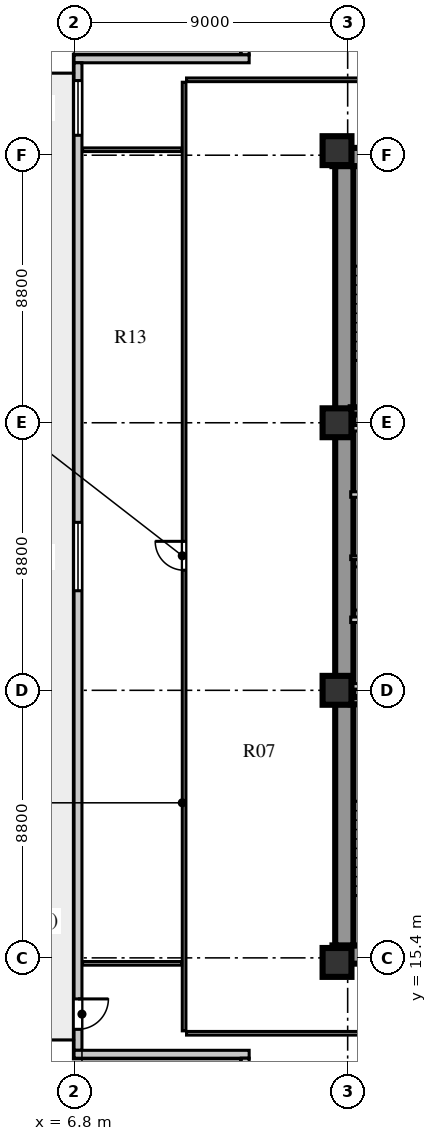
"""IFC4 building model, lengths in metres.
Left out: names, types, materials, properties, quantities, classifications, styles, units other than length and angle.
Written with IfcOpenShell. Run it as: python <this file> out.ifc"""

import sys

from ifc_helpers import new_model, si_unit, direction, frame, frame_2d, origin, origin_2d, place, context, subcontext, project, spatial, rectangle, extrude, element, fill, save


model = new_model("IFC4")
c1 = context("Model", 3, precision=1e-05, world=origin(), true_north=direction((0.0, 1.0)))
c2 = subcontext(c1, "Body", "Model", "MODEL_VIEW")
j1 = project(units=[si_unit("LENGTHUNIT", "METRE"), si_unit("PLANEANGLEUNIT", "RADIAN")], contexts=[c1])
p1 = place(None, origin())
s1 = spatial("IfcSite", under=j1, at=p1, CompositionType="ELEMENT")
p2 = place(p1, origin())
s2 = spatial("IfcBuilding", under=s1, at=p2, CompositionType="ELEMENT")
p3 = place(p2, frame((0.0, 0.0, 26.0)))
s3 = spatial("IfcBuildingStorey", under=s2, at=p3, CompositionType="ELEMENT", Elevation=26.0)
for number, where, z_axis, x_axis in (
    (1, (15.3, 15.51, 0.0), (0.0, 0.0, 1.0), (1.0, 0.0, 0.0)),
    (2, (15.3, 41.74, 0.0), (0.0, 0.0, 1.0), (1.0, 0.0, 0.0)),
):
    element("IfcWall", number, at=place(p3, frame(where, z_axis=z_axis, x_axis=x_axis)), inside=s3, PredefinedType="SHEAR", context=c2, shape_type="SweptSolid", body=[
        extrude(rectangle(XDim=9.88, YDim=0.6, at=frame_2d((4.94, 0.0))), origin(), (0.0, 0.0, 1.0), 3.72),
    ])
p4 = place(p3, frame((15.69, 15.81, 0.0), z_axis=(0.0, 0.0, 1.0), x_axis=(0.0, 1.0, 0.0)))
e3 = element("IfcWall", 3, at=p4, inside=s3, PredefinedType="SHEAR", context=c2, shape_type="SweptSolid", body=[
    extrude(rectangle(XDim=25.63, YDim=0.6, at=frame_2d((12.815, 0.0))), origin(), (0.0, 0.0, 1.0), 3.72),
])
for number, where, z_axis, x_axis in (
    (4, (15.45, 15.25, 0.0), (0.0, 0.0, 1.0), (1.0, 0.0, 0.0)),
    (5, (15.45, 24.2, 0.0), (0.0, 0.0, 1.0), (1.0, 0.0, 0.0)),
    (6, (15.45, 33.0, 0.0), (0.0, 0.0, 1.0), (1.0, 0.0, 0.0)),
    (7, (15.45, 41.95, 0.0), (0.0, 0.0, 1.0), (1.0, 0.0, 0.0)),
):
    element("IfcColumn", number, at=place(p3, frame(where, z_axis=z_axis, x_axis=x_axis)), inside=s3, PredefinedType="COLUMN", context=c2, shape_type="SweptSolid", body=[
        extrude(rectangle(XDim=0.95, YDim=0.95, at=origin_2d()), origin(), (0.0, 0.0, 1.0), 3.72),
    ])
p5 = place(p3, frame((12.43, 50.34, 0.0), z_axis=(0.0, 0.0, 1.0), x_axis=(0.0, -1.0, 0.0)))
e8 = element("IfcWall", 8, at=p5, inside=s3, PredefinedType="SOLIDWALL", context=c2, shape_type="SweptSolid", body=[
    extrude(rectangle(XDim=5.24, YDim=0.26, at=frame_2d((2.62, 0.0))), origin(), (0.0, 0.0, 1.0), 3.72),
])
p6 = place(p3, frame((12.56, 44.97, 0.0), z_axis=(0.0, 0.0, 1.0), x_axis=(-1.0, 0.0, 0.0)))
e9 = element("IfcWall", 9, at=p6, inside=s3, PredefinedType="SOLIDWALL", context=c2, shape_type="SweptSolid", body=[
    extrude(rectangle(XDim=5.76, YDim=0.26, at=frame_2d((2.88, 0.0))), origin(), (0.0, 0.0, 1.0), 3.72),
])
p7 = place(p3, frame((6.93, 44.84, 0.0), z_axis=(0.0, 0.0, 1.0), x_axis=(0.0, -1.0, 0.0)))
e10 = element("IfcWall", 10, at=p7, inside=s3, PredefinedType="SOLIDWALL", context=c2, shape_type="SweptSolid", body=[
    extrude(rectangle(XDim=32.48, YDim=0.26, at=frame_2d((16.24, 0.0))), origin(), (0.0, 0.0, 1.0), 3.72),
])
p8 = place(p7, frame((30.79, 0.0, 0.0)))
e11 = element("IfcOpeningElement", 11, at=p8, cuts=e10, PredefinedType="OPENING", context=c2, shape_type="SweptSolid", body=[
    extrude(rectangle(XDim=1.0, YDim=2.05, at=frame_2d((0.5, 1.025))), frame((0.0, 0.14, 0.0), z_axis=(0.0, -1.0, 0.0), x_axis=(1.0, 0.0, 0.0)), (0.0, 0.0, 1.0), 0.28),
])
p9 = place(p7, frame((15.115, 0.0, 0.8)))
e12 = element("IfcOpeningElement", 12, at=p9, cuts=e10, PredefinedType="OPENING", context=c2, shape_type="SweptSolid", body=[
    extrude(rectangle(XDim=2.25, YDim=2.0, at=frame_2d((1.125, 1.0))), frame((0.0, 0.14, 0.0), z_axis=(0.0, -1.0, 0.0), x_axis=(1.0, 0.0, 0.0)), (0.0, 0.0, 1.0), 0.28),
])
p10 = place(p7, frame((0.585, 0.0, 0.8)))
e13 = element("IfcOpeningElement", 13, at=p10, cuts=e10, PredefinedType="OPENING", context=c2, shape_type="SweptSolid", body=[
    extrude(rectangle(XDim=1.8, YDim=2.0, at=frame_2d((0.9, 1.0))), frame((0.0, 0.14, 0.0), z_axis=(0.0, -1.0, 0.0), x_axis=(1.0, 0.0, 0.0)), (0.0, 0.0, 1.0), 0.28),
])
p11 = place(p3, frame((6.8, 12.23, 0.0), z_axis=(0.0, 0.0, 1.0), x_axis=(1.0, 0.0, 0.0)))
e14 = element("IfcWall", 14, at=p11, inside=s3, PredefinedType="SOLIDWALL", context=c2, shape_type="SweptSolid", body=[
    extrude(rectangle(XDim=5.76, YDim=0.26, at=frame_2d((2.88, 0.0))), origin(), (0.0, 0.0, 1.0), 3.72),
])
p12 = place(p3, frame((12.43, 12.1, 0.0), z_axis=(0.0, 0.0, 1.0), x_axis=(0.0, -1.0, 0.0)))
e15 = element("IfcWall", 15, at=p12, inside=s3, PredefinedType="SOLIDWALL", context=c2, shape_type="SweptSolid", body=[
    extrude(rectangle(XDim=5.24, YDim=0.26, at=frame_2d((2.62, 0.0))), origin(), (0.0, 0.0, 1.0), 3.72),
])
p13 = place(p3, frame((15.9, 23.86, 0.0), z_axis=(0.0, 0.0, 1.0), x_axis=(1.0, 0.0, 0.0)))
e16 = element("IfcWall", 16, at=p13, inside=s3, PredefinedType="SHEAR", context=c2, shape_type="SweptSolid", body=[
    extrude(rectangle(XDim=3.52, YDim=0.24, at=frame_2d((1.76, 0.0))), origin(), (0.0, 0.0, 1.0), 4.0),
])
p14 = place(p3, frame((15.9, 26.52, 0.0), z_axis=(0.0, 0.0, 1.0), x_axis=(1.0, 0.0, 0.0)))
e17 = element("IfcWall", 17, at=p14, inside=s3, PredefinedType="SOLIDWALL", context=c2, shape_type="SweptSolid", body=[
    extrude(rectangle(XDim=8.68, YDim=0.18, at=frame_2d((4.34, 0.0))), origin(), (0.0, 0.0, 1.0), 3.72),
])
p15 = place(p14, frame((1.76, 0.0, 0.0)))
e18 = element("IfcOpeningElement", 18, at=p15, cuts=e17, PredefinedType="OPENING", context=c2, shape_type="SweptSolid", body=[
    extrude(rectangle(XDim=1.0, YDim=2.1, at=frame_2d((0.5, 1.05))), frame((0.0, 0.1, 0.0), z_axis=(0.0, -1.0, 0.0), x_axis=(1.0, 0.0, 0.0)), (0.0, 0.0, 1.0), 0.2),
])
p16 = place(p14, frame((3.6, 0.0, 0.0)))
e19 = element("IfcOpeningElement", 19, at=p16, cuts=e17, PredefinedType="OPENING", context=c2, shape_type="SweptSolid", body=[
    extrude(rectangle(XDim=1.0, YDim=2.1, at=frame_2d((0.5, 1.05))), frame((0.0, 0.1, 0.0), z_axis=(0.0, -1.0, 0.0), x_axis=(1.0, 0.0, 0.0)), (0.0, 0.0, 1.0), 0.2),
])
p17 = place(p14, frame((5.44, 0.0, 0.0)))
e20 = element("IfcOpeningElement", 20, at=p17, cuts=e17, PredefinedType="OPENING", context=c2, shape_type="SweptSolid", body=[
    extrude(rectangle(XDim=1.0, YDim=2.1, at=frame_2d((0.5, 1.05))), frame((0.0, 0.1, 0.0), z_axis=(0.0, -1.0, 0.0), x_axis=(1.0, 0.0, 0.0)), (0.0, 0.0, 1.0), 0.2),
])
p18 = place(p14, frame((7.28, 0.0, 0.0)))
e21 = element("IfcOpeningElement", 21, at=p18, cuts=e17, PredefinedType="OPENING", context=c2, shape_type="SweptSolid", body=[
    extrude(rectangle(XDim=1.0, YDim=2.1, at=frame_2d((0.5, 1.05))), frame((0.0, 0.1, 0.0), z_axis=(0.0, -1.0, 0.0), x_axis=(1.0, 0.0, 0.0)), (0.0, 0.0, 1.0), 0.2),
])
p19 = place(p3, frame((15.9, 24.33, 0.0), z_axis=(0.0, 0.0, 1.0), x_axis=(1.0, 0.0, 0.0)))
e22 = element("IfcWall", 22, at=p19, inside=s3, PredefinedType="SOLIDWALL", context=c2, shape_type="SweptSolid", body=[
    extrude(rectangle(XDim=8.68, YDim=0.18, at=frame_2d((4.34, 0.0))), origin(), (0.0, 0.0, 1.0), 3.02),
])
p20 = place(p3, frame((15.9, 28.56, 0.0), z_axis=(0.0, 0.0, 1.0), x_axis=(1.0, 0.0, 0.0)))
e23 = element("IfcWall", 23, at=p20, inside=s3, PredefinedType="PARTITIONING", context=c2, shape_type="SweptSolid", body=[
    extrude(rectangle(XDim=1.2, YDim=0.12, at=frame_2d((0.6, 0.0))), origin(), (0.0, 0.0, 1.0), 3.72),
])
p21 = place(p3, frame((15.9, 30.64, 0.0), z_axis=(0.0, 0.0, 1.0), x_axis=(1.0, 0.0, 0.0)))
e24 = element("IfcWall", 24, at=p21, inside=s3, PredefinedType="SOLIDWALL", context=c2, shape_type="SweptSolid", body=[
    extrude(rectangle(XDim=8.68, YDim=0.18, at=frame_2d((4.34, 0.0))), origin(), (0.0, 0.0, 1.0), 3.72),
])
p22 = place(p21, frame((1.76, 0.0, 0.0)))
e25 = element("IfcOpeningElement", 25, at=p22, cuts=e24, PredefinedType="OPENING", context=c2, shape_type="SweptSolid", body=[
    extrude(rectangle(XDim=1.0, YDim=2.1, at=frame_2d((0.5, 1.05))), frame((0.0, 0.1, 0.0), z_axis=(0.0, -1.0, 0.0), x_axis=(1.0, 0.0, 0.0)), (0.0, 0.0, 1.0), 0.2),
])
p23 = place(p21, frame((3.6, 0.0, 0.0)))
e26 = element("IfcOpeningElement", 26, at=p23, cuts=e24, PredefinedType="OPENING", context=c2, shape_type="SweptSolid", body=[
    extrude(rectangle(XDim=1.0, YDim=2.1, at=frame_2d((0.5, 1.05))), frame((0.0, 0.1, 0.0), z_axis=(0.0, -1.0, 0.0), x_axis=(1.0, 0.0, 0.0)), (0.0, 0.0, 1.0), 0.2),
])
p24 = place(p21, frame((5.44, 0.0, 0.0)))
e27 = element("IfcOpeningElement", 27, at=p24, cuts=e24, PredefinedType="OPENING", context=c2, shape_type="SweptSolid", body=[
    extrude(rectangle(XDim=1.0, YDim=2.1, at=frame_2d((0.5, 1.05))), frame((0.0, 0.1, 0.0), z_axis=(0.0, -1.0, 0.0), x_axis=(1.0, 0.0, 0.0)), (0.0, 0.0, 1.0), 0.2),
])
p25 = place(p21, frame((7.28, 0.0, 0.0)))
e28 = element("IfcOpeningElement", 28, at=p25, cuts=e24, PredefinedType="OPENING", context=c2, shape_type="SweptSolid", body=[
    extrude(rectangle(XDim=1.0, YDim=2.1, at=frame_2d((0.5, 1.05))), frame((0.0, 0.1, 0.0), z_axis=(0.0, -1.0, 0.0), x_axis=(1.0, 0.0, 0.0)), (0.0, 0.0, 1.0), 0.2),
])
p26 = place(p3, frame((15.9, 32.82, 0.0), z_axis=(0.0, 0.0, 1.0), x_axis=(1.0, 0.0, 0.0)))
e29 = element("IfcWall", 29, at=p26, inside=s3, PredefinedType="SOLIDWALL", context=c2, shape_type="SweptSolid", body=[
    extrude(rectangle(XDim=8.68, YDim=0.18, at=frame_2d((4.34, 0.0))), origin(), (0.0, 0.0, 1.0), 3.02),
])
p27 = place(p3, frame((15.9, 33.39, 0.0), z_axis=(0.0, 0.0, 1.0), x_axis=(1.0, 0.0, 0.0)))
e30 = element("IfcWall", 30, at=p27, inside=s3, PredefinedType="SHEAR", context=c2, shape_type="SweptSolid", body=[
    extrude(rectangle(XDim=3.52, YDim=0.24, at=frame_2d((1.76, 0.0))), origin(), (0.0, 0.0, 1.0), 4.0),
])
p28 = place(p3, frame((10.42, 13.0, 0.0), z_axis=(0.0, 0.0, 1.0), x_axis=(0.0, 1.0, 0.0)))
e31 = element("IfcWall", 31, at=p28, inside=s3, PredefinedType="PARTITIONING", context=c2, shape_type="SweptSolid", body=[
    extrude(rectangle(XDim=31.2, YDim=0.12, at=frame_2d((15.6, 0.0))), origin(), (0.0, 0.0, 1.0), 3.72),
])
p29 = place(p28, frame((15.15, 0.0, 0.0)))
e32 = element("IfcOpeningElement", 32, at=p29, cuts=e31, PredefinedType="OPENING", context=c2, shape_type="SweptSolid", body=[
    extrude(rectangle(XDim=0.95, YDim=2.08, at=frame_2d((0.475, 1.04))), frame((0.0, 0.07, 0.0), z_axis=(0.0, -1.0, 0.0), x_axis=(1.0, 0.0, 0.0)), (0.0, 0.0, 1.0), 0.14),
])
for number, where, z_axis, x_axis in (
    (33, (7.08, 15.22, 0.0), (0.0, 0.0, 1.0), (1.0, 0.0, 0.0)),
    (34, (7.08, 41.98, 0.0), (0.0, 0.0, 1.0), (1.0, 0.0, 0.0)),
):
    element("IfcWall", number, at=place(p3, frame(where, z_axis=z_axis, x_axis=x_axis)), inside=s3, PredefinedType="PARTITIONING", context=c2, shape_type="SweptSolid", body=[
        extrude(rectangle(XDim=3.26, YDim=0.12, at=frame_2d((1.63, 0.0))), origin(), (0.0, 0.0, 1.0), 3.22),
    ])
p30 = place(p3, frame((10.5, 12.92, 0.0), z_axis=(0.0, 0.0, 1.0), x_axis=(1.0, 0.0, 0.0)))
e35 = element("IfcWall", 35, at=p30, inside=s3, PredefinedType="PARTITIONING", context=c2, shape_type="SweptSolid", body=[
    extrude(rectangle(XDim=14.7, YDim=0.12, at=frame_2d((7.35, 0.0))), origin(), (0.0, 0.0, 1.0), 3.72),
])
p31 = place(p30, frame((6.2, 0.0, 0.0)))
e36 = element("IfcOpeningElement", 36, at=p31, cuts=e35, PredefinedType="OPENING", context=c2, shape_type="SweptSolid", body=[
    extrude(rectangle(XDim=1.0, YDim=2.08, at=frame_2d((0.5, 1.04))), frame((0.0, 0.07, 0.0), z_axis=(0.0, -1.0, 0.0), x_axis=(1.0, 0.0, 0.0)), (0.0, 0.0, 1.0), 0.14),
])
p32 = place(p3, frame((10.5, 44.28, 0.0), z_axis=(0.0, 0.0, 1.0), x_axis=(1.0, 0.0, 0.0)))
e37 = element("IfcWall", 37, at=p32, inside=s3, PredefinedType="PARTITIONING", context=c2, shape_type="SweptSolid", body=[
    extrude(rectangle(XDim=14.7, YDim=0.12, at=frame_2d((7.35, 0.0))), origin(), (0.0, 0.0, 1.0), 3.72),
])
p33 = place(p32, frame((6.2, 0.0, 0.0)))
e38 = element("IfcOpeningElement", 38, at=p33, cuts=e37, PredefinedType="OPENING", context=c2, shape_type="SweptSolid", body=[
    extrude(rectangle(XDim=1.0, YDim=2.08, at=frame_2d((0.5, 1.04))), frame((0.0, 0.07, 0.0), z_axis=(0.0, -1.0, 0.0), x_axis=(1.0, 0.0, 0.0)), (0.0, 0.0, 1.0), 0.14),
])
p34 = place(p8, frame((1.0, 0.0, 0.0), z_axis=(0.0, 0.0, 1.0), x_axis=(-1.0, 0.0, 0.0)))
e39 = element("IfcDoor", 39, at=p34, inside=s3, OperationType="SINGLE_SWING_RIGHT", PredefinedType="DOOR", context=c2, shape_type="SweptSolid", body=[
    extrude(rectangle(XDim=1.0, YDim=2.05, at=frame_2d((0.5, 1.025))), frame((0.0, 0.025, 0.0), z_axis=(0.0, -1.0, 0.0), x_axis=(1.0, 0.0, 0.0)), (0.0, 0.0, 1.0), 0.05),
])
fill(e11, e39)
p35 = place(p9, origin())
e40 = element("IfcWindow", 40, at=p35, inside=s3, PartitioningType="SINGLE_PANEL", PredefinedType="WINDOW", context=c2, shape_type="SweptSolid", body=[
    extrude(rectangle(XDim=2.25, YDim=2.0, at=frame_2d((1.125, 1.0))), frame((0.0, 0.03, 0.0), z_axis=(0.0, -1.0, 0.0), x_axis=(1.0, 0.0, 0.0)), (0.0, 0.0, 1.0), 0.06),
])
fill(e12, e40)
p36 = place(p10, origin())
e41 = element("IfcWindow", 41, at=p36, inside=s3, PartitioningType="SINGLE_PANEL", PredefinedType="WINDOW", context=c2, shape_type="SweptSolid", body=[
    extrude(rectangle(XDim=1.8, YDim=2.0, at=frame_2d((0.9, 1.0))), frame((0.0, 0.03, 0.0), z_axis=(0.0, -1.0, 0.0), x_axis=(1.0, 0.0, 0.0)), (0.0, 0.0, 1.0), 0.06),
])
fill(e13, e41)
p37 = place(p29, frame((0.95, 0.0, 0.0), z_axis=(0.0, 0.0, 1.0), x_axis=(-1.0, 0.0, 0.0)))
e42 = element("IfcDoor", 42, at=p37, inside=s3, OperationType="SINGLE_SWING_LEFT", PredefinedType="DOOR", context=c2, shape_type="SweptSolid", body=[
    extrude(rectangle(XDim=0.95, YDim=2.08, at=frame_2d((0.475, 1.04))), frame((0.0, 0.025, 0.0), z_axis=(0.0, -1.0, 0.0), x_axis=(1.0, 0.0, 0.0)), (0.0, 0.0, 1.0), 0.05),
])
fill(e32, e42)
save(model, sys.argv[1])
